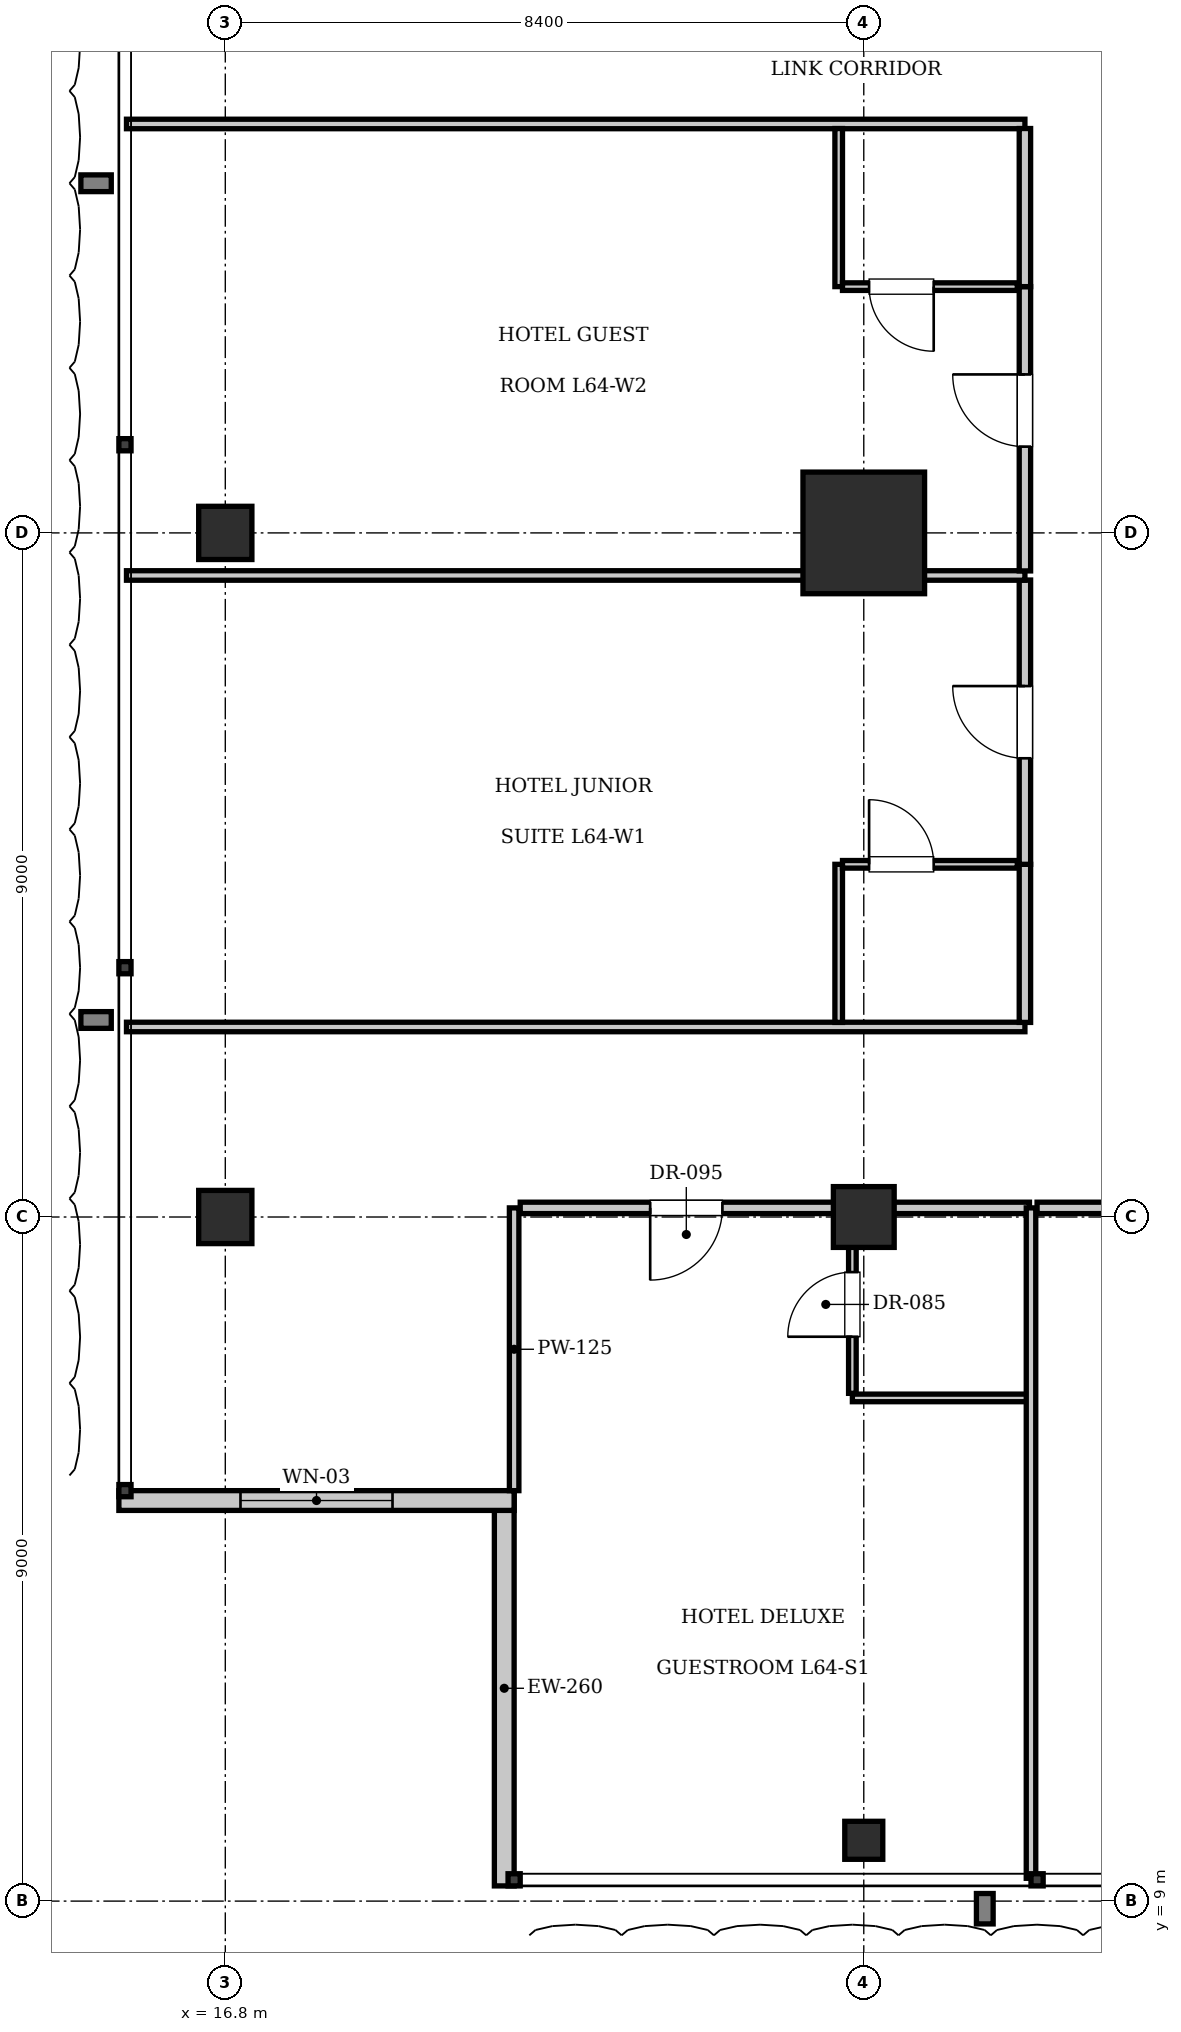
"""IFC4 building model, lengths in metres.
Left out: names, types, materials, properties, quantities, classifications, styles, units other than length and angle.
Written with IfcOpenShell. Run it as: python <this file> out.ifc"""

import sys

from ifc_helpers import new_model, si_unit, direction, frame, frame_2d, origin, origin_2d, place, context, subcontext, project, spatial, rectangle, i_section, extrude, element, fill, save


model = new_model("IFC4")
c1 = context("Model", 3, precision=1e-05, world=origin(), true_north=direction((0.0, 1.0)))
c2 = subcontext(c1, "Body", "Model", "MODEL_VIEW")
j1 = project(units=[si_unit("LENGTHUNIT", "METRE"), si_unit("PLANEANGLEUNIT", "RADIAN")], contexts=[c1])
p1 = place(None, origin())
s1 = spatial("IfcSite", under=j1, at=p1, CompositionType="ELEMENT")
p2 = place(p1, origin())
s2 = spatial("IfcBuilding", under=s1, at=p2, CompositionType="ELEMENT")
p3 = place(p2, frame((0.0, 0.0, 262.5)))
s3 = spatial("IfcBuildingStorey", under=s2, at=p3, CompositionType="ELEMENT", Elevation=262.5)
p4 = place(p3, frame((25.2, 27.0, 0.0), z_axis=(0.0, 0.0, 1.0), x_axis=(1.0, 0.0, 0.0)))
e1 = element("IfcColumn", 1, at=p4, inside=s3, PredefinedType="COLUMN", context=c2, shape_type="SweptSolid", body=[
    extrude(rectangle(XDim=1.6, YDim=1.6, at=origin_2d()), origin(), (0.0, 0.0, 1.0), 3.85),
])
p5 = place(p3, frame((25.2, 18.0, 0.0), z_axis=(0.0, 0.0, 1.0), x_axis=(1.0, 0.0, 0.0)))
e2 = element("IfcColumn", 2, at=p5, inside=s3, PredefinedType="COLUMN", context=c2, shape_type="SweptSolid", body=[
    extrude(rectangle(XDim=0.8, YDim=0.8, at=origin_2d()), origin(), (0.0, 0.0, 1.0), 3.85),
])
for number, where, z_axis, x_axis in (
    (3, (16.8, 18.0, 0.0), (0.0, 0.0, 1.0), (1.0, 0.0, 0.0)),
    (4, (16.8, 27.0, 0.0), (0.0, 0.0, 1.0), (1.0, 0.0, 0.0)),
):
    element("IfcColumn", number, at=place(p3, frame(where, z_axis=z_axis, x_axis=x_axis)), inside=s3, PredefinedType="COLUMN", context=c2, shape_type="SweptSolid", body=[
        extrude(rectangle(XDim=0.7, YDim=0.7, at=origin_2d()), origin(), (0.0, 0.0, 1.0), 3.85),
    ])
p6 = place(p3, frame((25.2, 9.8, 0.0), z_axis=(0.0, 0.0, 1.0), x_axis=(1.0, 0.0, 0.0)))
e5 = element("IfcColumn", 5, at=p6, inside=s3, PredefinedType="COLUMN", context=c2, shape_type="SweptSolid", body=[
    extrude(i_section(OverallWidth=0.5, OverallDepth=0.5, WebThickness=0.022, FlangeThickness=0.032, at=origin_2d()), origin(), (0.0, 0.0, 1.0), 3.85),
])
p7 = place(p3, frame((20.47, 9.2, 0.0), z_axis=(0.0, 0.0, 1.0), x_axis=(0.0, 1.0, 0.0)))
e6 = element("IfcWall", 6, at=p7, inside=s3, PredefinedType="SOLIDWALL", context=c2, shape_type="SweptSolid", body=[
    extrude(rectangle(XDim=5.2, YDim=0.26, at=frame_2d((2.6, 0.0))), origin(), (0.0, 0.0, 1.0), 3.61),
])
p8 = place(p3, frame((20.6, 14.27, 0.0), z_axis=(0.0, 0.0, 1.0), x_axis=(-1.0, 0.0, 0.0)))
e7 = element("IfcWall", 7, at=p8, inside=s3, PredefinedType="SOLIDWALL", context=c2, shape_type="SweptSolid", body=[
    extrude(rectangle(XDim=5.2, YDim=0.26, at=frame_2d((2.6, 0.0))), origin(), (0.0, 0.0, 1.0), 3.61),
])
p9 = place(p8, frame((1.6, 0.0, 0.9)))
e8 = element("IfcOpeningElement", 8, at=p9, cuts=e7, PredefinedType="OPENING", context=c2, shape_type="SweptSolid", body=[
    extrude(rectangle(XDim=2.0, YDim=2.2, at=frame_2d((1.0, 1.1))), frame((0.0, 0.14, 0.0), z_axis=(0.0, -1.0, 0.0), x_axis=(1.0, 0.0, 0.0)), (0.0, 0.0, 1.0), 0.28),
])
p10 = place(p3, frame((20.6, 14.4, 0.0), z_axis=(0.0, 0.0, 1.0), x_axis=(0.0, 1.0, 0.0)))
e9 = element("IfcWall", 9, at=p10, inside=s3, PredefinedType="PARTITIONING", context=c2, shape_type="SweptSolid", body=[
    extrude(rectangle(XDim=3.72, YDim=0.125, at=frame_2d((1.86, 0.0))), origin(), (0.0, 0.0, 1.0), 3.61),
])
p11 = place(p3, frame((25.05, 18.12, 0.0), z_axis=(0.0, 0.0, 1.0), x_axis=(1.0, 0.0, 0.0)))
e10 = element("IfcWall", 10, at=p11, inside=s3, PredefinedType="PARTITIONING", context=c2, shape_type="SweptSolid", body=[
    extrude(rectangle(XDim=2.33, YDim=0.15, at=frame_2d((1.165, 0.0))), origin(), (0.0, 0.0, 1.0), 3.077),
])
p12 = place(p3, frame((25.05, 15.62, 0.0), z_axis=(0.0, 0.0, 1.0), x_axis=(1.0, 0.0, 0.0)))
e11 = element("IfcWall", 11, at=p12, inside=s3, PredefinedType="PARTITIONING", context=c2, shape_type="SweptSolid", body=[
    extrude(rectangle(XDim=2.31, YDim=0.1, at=frame_2d((1.155, 0.0))), origin(), (0.0, 0.0, 1.0), 3.61),
])
p13 = place(p3, frame((25.05, 15.68, 0.0), z_axis=(0.0, 0.0, 1.0), x_axis=(0.0, 1.0, 0.0)))
e12 = element("IfcWall", 12, at=p13, inside=s3, PredefinedType="PARTITIONING", context=c2, shape_type="SweptSolid", body=[
    extrude(rectangle(XDim=2.34, YDim=0.1, at=frame_2d((1.17, 0.0))), origin(), (0.0, 0.0, 1.0), 3.61),
])
p14 = place(p13, frame((0.745, 0.0, 0.0)))
e13 = element("IfcOpeningElement", 13, at=p14, cuts=e12, PredefinedType="OPENING", context=c2, shape_type="SweptSolid", body=[
    extrude(rectangle(XDim=0.85, YDim=2.1, at=frame_2d((0.425, 1.05))), frame((0.0, 0.06, 0.0), z_axis=(0.0, -1.0, 0.0), x_axis=(1.0, 0.0, 0.0)), (0.0, 0.0, 1.0), 0.12),
])
p15 = place(p3, frame((20.68, 18.12, 0.0), z_axis=(0.0, 0.0, 1.0), x_axis=(1.0, 0.0, 0.0)))
e14 = element("IfcWall", 14, at=p15, inside=s3, PredefinedType="PARTITIONING", context=c2, shape_type="SweptSolid", body=[
    extrude(rectangle(XDim=4.37, YDim=0.15, at=frame_2d((2.185, 0.0))), origin(), (0.0, 0.0, 1.0), 3.077),
])
p16 = place(p15, frame((1.71, 0.0, 0.0)))
e15 = element("IfcOpeningElement", 15, at=p16, cuts=e14, PredefinedType="OPENING", context=c2, shape_type="SweptSolid", body=[
    extrude(rectangle(XDim=0.95, YDim=2.15, at=frame_2d((0.475, 1.075))), frame((0.0, 0.085, 0.0), z_axis=(0.0, -1.0, 0.0), x_axis=(1.0, 0.0, 0.0)), (0.0, 0.0, 1.0), 0.17),
])
p17 = place(p3, frame((27.4, 9.3, 0.0), z_axis=(0.0, 0.0, 1.0), x_axis=(0.0, 1.0, 0.0)))
e16 = element("IfcWall", 16, at=p17, inside=s3, PredefinedType="PARTITIONING", context=c2, shape_type="SweptSolid", body=[
    extrude(rectangle(XDim=8.82, YDim=0.125, at=frame_2d((4.41, 0.0))), origin(), (0.0, 0.0, 1.0), 3.61),
])
p18 = place(p3, frame((27.48, 18.12, 0.0), z_axis=(0.0, 0.0, 1.0), x_axis=(1.0, 0.0, 0.0)))
e17 = element("IfcWall", 17, at=p18, inside=s3, PredefinedType="PARTITIONING", context=c2, shape_type="SweptSolid", body=[
    extrude(rectangle(XDim=4.47, YDim=0.15, at=frame_2d((2.235, 0.0))), origin(), (0.0, 0.0, 1.0), 3.077),
])
p19 = place(p18, frame((1.76, 0.0, 0.0)))
e18 = element("IfcOpeningElement", 18, at=p19, cuts=e17, PredefinedType="OPENING", context=c2, shape_type="SweptSolid", body=[
    extrude(rectangle(XDim=0.95, YDim=2.15, at=frame_2d((0.475, 1.075))), frame((0.0, 0.085, 0.0), z_axis=(0.0, -1.0, 0.0), x_axis=(1.0, 0.0, 0.0)), (0.0, 0.0, 1.0), 0.17),
])
for number, where, z_axis, x_axis in (
    (19, (15.5, 20.5, 0.0), (0.0, 0.0, 1.0), (1.0, 0.0, 0.0)),
    (20, (15.5, 32.38, 0.0), (0.0, 0.0, 1.0), (1.0, 0.0, 0.0)),
):
    element("IfcWall", number, at=place(p3, frame(where, z_axis=z_axis, x_axis=x_axis)), inside=s3, PredefinedType="PARTITIONING", context=c2, shape_type="SweptSolid", body=[
        extrude(rectangle(XDim=11.82, YDim=0.125, at=frame_2d((5.91, 0.0))), origin(), (0.0, 0.0, 1.0), 3.61),
    ])
p20 = place(p3, frame((27.32, 20.56, 0.0), z_axis=(0.0, 0.0, 1.0), x_axis=(0.0, 1.0, 0.0)))
e21 = element("IfcWall", 21, at=p20, inside=s3, PredefinedType="PARTITIONING", context=c2, shape_type="SweptSolid", body=[
    extrude(rectangle(XDim=2.08, YDim=0.15, at=frame_2d((1.04, 0.0))), origin(), (0.0, 0.0, 1.0), 3.61),
])
p21 = place(p3, frame((27.32, 22.64, 0.0), z_axis=(0.0, 0.0, 1.0), x_axis=(0.0, 1.0, 0.0)))
e22 = element("IfcWall", 22, at=p21, inside=s3, PredefinedType="PARTITIONING", context=c2, shape_type="SweptSolid", body=[
    extrude(rectangle(XDim=3.74, YDim=0.15, at=frame_2d((1.87, 0.0))), origin(), (0.0, 0.0, 1.0), 3.61),
])
p22 = place(p21, frame((1.395, 0.0, 0.0)))
e23 = element("IfcOpeningElement", 23, at=p22, cuts=e22, PredefinedType="OPENING", context=c2, shape_type="SweptSolid", body=[
    extrude(rectangle(XDim=0.95, YDim=2.15, at=frame_2d((0.475, 1.075))), frame((0.0, 0.085, 0.0), z_axis=(0.0, -1.0, 0.0), x_axis=(1.0, 0.0, 0.0)), (0.0, 0.0, 1.0), 0.17),
])
p23 = place(p3, frame((24.87, 20.56, 0.0), z_axis=(0.0, 0.0, 1.0), x_axis=(0.0, 1.0, 0.0)))
e24 = element("IfcWall", 24, at=p23, inside=s3, PredefinedType="PARTITIONING", context=c2, shape_type="SweptSolid", body=[
    extrude(rectangle(XDim=2.08, YDim=0.1, at=frame_2d((1.04, 0.0))), origin(), (0.0, 0.0, 1.0), 3.61),
])
p24 = place(p3, frame((24.92, 22.64, 0.0), z_axis=(0.0, 0.0, 1.0), x_axis=(1.0, 0.0, 0.0)))
e25 = element("IfcWall", 25, at=p24, inside=s3, PredefinedType="PARTITIONING", context=c2, shape_type="SweptSolid", body=[
    extrude(rectangle(XDim=2.3, YDim=0.1, at=frame_2d((1.15, 0.0))), origin(), (0.0, 0.0, 1.0), 3.61),
])
p25 = place(p24, frame((0.35, 0.0, 0.0)))
e26 = element("IfcOpeningElement", 26, at=p25, cuts=e25, PredefinedType="OPENING", context=c2, shape_type="SweptSolid", body=[
    extrude(rectangle(XDim=0.85, YDim=2.1, at=frame_2d((0.425, 1.05))), frame((0.0, 0.06, 0.0), z_axis=(0.0, -1.0, 0.0), x_axis=(1.0, 0.0, 0.0)), (0.0, 0.0, 1.0), 0.12),
])
p26 = place(p3, frame((15.5, 26.44, 0.0), z_axis=(0.0, 0.0, 1.0), x_axis=(1.0, 0.0, 0.0)))
e27 = element("IfcWall", 27, at=p26, inside=s3, PredefinedType="PARTITIONING", context=c2, shape_type="SweptSolid", body=[
    extrude(rectangle(XDim=11.82, YDim=0.125, at=frame_2d((5.91, 0.0))), origin(), (0.0, 0.0, 1.0), 3.61),
])
p27 = place(p3, frame((27.32, 26.5, 0.0), z_axis=(0.0, 0.0, 1.0), x_axis=(0.0, 1.0, 0.0)))
e28 = element("IfcWall", 28, at=p27, inside=s3, PredefinedType="PARTITIONING", context=c2, shape_type="SweptSolid", body=[
    extrude(rectangle(XDim=3.74, YDim=0.15, at=frame_2d((1.87, 0.0))), origin(), (0.0, 0.0, 1.0), 3.61),
])
p28 = place(p27, frame((1.635, 0.0, 0.0)))
e29 = element("IfcOpeningElement", 29, at=p28, cuts=e28, PredefinedType="OPENING", context=c2, shape_type="SweptSolid", body=[
    extrude(rectangle(XDim=0.95, YDim=2.15, at=frame_2d((0.475, 1.075))), frame((0.0, 0.085, 0.0), z_axis=(0.0, -1.0, 0.0), x_axis=(1.0, 0.0, 0.0)), (0.0, 0.0, 1.0), 0.17),
])
p29 = place(p3, frame((27.32, 30.24, 0.0), z_axis=(0.0, 0.0, 1.0), x_axis=(0.0, 1.0, 0.0)))
e30 = element("IfcWall", 30, at=p29, inside=s3, PredefinedType="PARTITIONING", context=c2, shape_type="SweptSolid", body=[
    extrude(rectangle(XDim=2.08, YDim=0.15, at=frame_2d((1.04, 0.0))), origin(), (0.0, 0.0, 1.0), 3.61),
])
p30 = place(p3, frame((24.87, 30.24, 0.0), z_axis=(0.0, 0.0, 1.0), x_axis=(0.0, 1.0, 0.0)))
e31 = element("IfcWall", 31, at=p30, inside=s3, PredefinedType="PARTITIONING", context=c2, shape_type="SweptSolid", body=[
    extrude(rectangle(XDim=2.08, YDim=0.1, at=frame_2d((1.04, 0.0))), origin(), (0.0, 0.0, 1.0), 3.61),
])
p31 = place(p3, frame((24.92, 30.24, 0.0), z_axis=(0.0, 0.0, 1.0), x_axis=(1.0, 0.0, 0.0)))
e32 = element("IfcWall", 32, at=p31, inside=s3, PredefinedType="PARTITIONING", context=c2, shape_type="SweptSolid", body=[
    extrude(rectangle(XDim=2.3, YDim=0.1, at=frame_2d((1.15, 0.0))), origin(), (0.0, 0.0, 1.0), 3.61),
])
p32 = place(p31, frame((0.35, 0.0, 0.0)))
e33 = element("IfcOpeningElement", 33, at=p32, cuts=e32, PredefinedType="OPENING", context=c2, shape_type="SweptSolid", body=[
    extrude(rectangle(XDim=0.85, YDim=2.1, at=frame_2d((0.425, 1.05))), frame((0.0, 0.06, 0.0), z_axis=(0.0, -1.0, 0.0), x_axis=(1.0, 0.0, 0.0)), (0.0, 0.0, 1.0), 0.12),
])
p33 = place(p9, origin())
e34 = element("IfcWindow", 34, at=p33, inside=s3, PartitioningType="SINGLE_PANEL", PredefinedType="WINDOW", context=c2, shape_type="SweptSolid", body=[
    extrude(rectangle(XDim=2.0, YDim=2.2, at=frame_2d((1.0, 1.1))), frame((0.0, 0.03, 0.0), z_axis=(0.0, -1.0, 0.0), x_axis=(1.0, 0.0, 0.0)), (0.0, 0.0, 1.0), 0.06),
])
fill(e8, e34)
p34 = place(p14, origin())
e35 = element("IfcDoor", 35, at=p34, inside=s3, OperationType="SINGLE_SWING_LEFT", PredefinedType="DOOR", context=c2, shape_type="SweptSolid", body=[
    extrude(rectangle(XDim=0.85, YDim=2.1, at=frame_2d((0.425, 1.05))), frame((0.0, 0.025, 0.0), z_axis=(0.0, -1.0, 0.0), x_axis=(1.0, 0.0, 0.0)), (0.0, 0.0, 1.0), 0.05),
])
fill(e13, e35)
p35 = place(p16, frame((0.95, 0.0, 0.0), z_axis=(0.0, 0.0, 1.0), x_axis=(-1.0, 0.0, 0.0)))
e36 = element("IfcDoor", 36, at=p35, inside=s3, OperationType="SINGLE_SWING_RIGHT", PredefinedType="DOOR", context=c2, shape_type="SweptSolid", body=[
    extrude(rectangle(XDim=0.95, YDim=2.15, at=frame_2d((0.475, 1.075))), frame((0.0, 0.025, 0.0), z_axis=(0.0, -1.0, 0.0), x_axis=(1.0, 0.0, 0.0)), (0.0, 0.0, 1.0), 0.05),
])
fill(e15, e36)
p36 = place(p25, origin())
e37 = element("IfcDoor", 37, at=p36, inside=s3, OperationType="SINGLE_SWING_LEFT", PredefinedType="DOOR", context=c2, shape_type="SweptSolid", body=[
    extrude(rectangle(XDim=0.85, YDim=2.1, at=frame_2d((0.425, 1.05))), frame((0.0, 0.025, 0.0), z_axis=(0.0, -1.0, 0.0), x_axis=(1.0, 0.0, 0.0)), (0.0, 0.0, 1.0), 0.05),
])
fill(e26, e37)
p37 = place(p22, origin())
e38 = element("IfcDoor", 38, at=p37, inside=s3, OperationType="SINGLE_SWING_RIGHT", PredefinedType="DOOR", context=c2, shape_type="SweptSolid", body=[
    extrude(rectangle(XDim=0.95, YDim=2.15, at=frame_2d((0.475, 1.075))), frame((0.0, 0.025, 0.0), z_axis=(0.0, -1.0, 0.0), x_axis=(1.0, 0.0, 0.0)), (0.0, 0.0, 1.0), 0.05),
])
fill(e23, e38)
p38 = place(p32, frame((0.85, 0.0, 0.0), z_axis=(0.0, 0.0, 1.0), x_axis=(-1.0, 0.0, 0.0)))
e39 = element("IfcDoor", 39, at=p38, inside=s3, OperationType="SINGLE_SWING_LEFT", PredefinedType="DOOR", context=c2, shape_type="SweptSolid", body=[
    extrude(rectangle(XDim=0.85, YDim=2.1, at=frame_2d((0.425, 1.05))), frame((0.0, 0.025, 0.0), z_axis=(0.0, -1.0, 0.0), x_axis=(1.0, 0.0, 0.0)), (0.0, 0.0, 1.0), 0.05),
])
fill(e33, e39)
p39 = place(p28, origin())
e40 = element("IfcDoor", 40, at=p39, inside=s3, OperationType="SINGLE_SWING_RIGHT", PredefinedType="DOOR", context=c2, shape_type="SweptSolid", body=[
    extrude(rectangle(XDim=0.95, YDim=2.15, at=frame_2d((0.475, 1.075))), frame((0.0, 0.025, 0.0), z_axis=(0.0, -1.0, 0.0), x_axis=(1.0, 0.0, 0.0)), (0.0, 0.0, 1.0), 0.05),
])
fill(e29, e40)
save(model, sys.argv[1])
